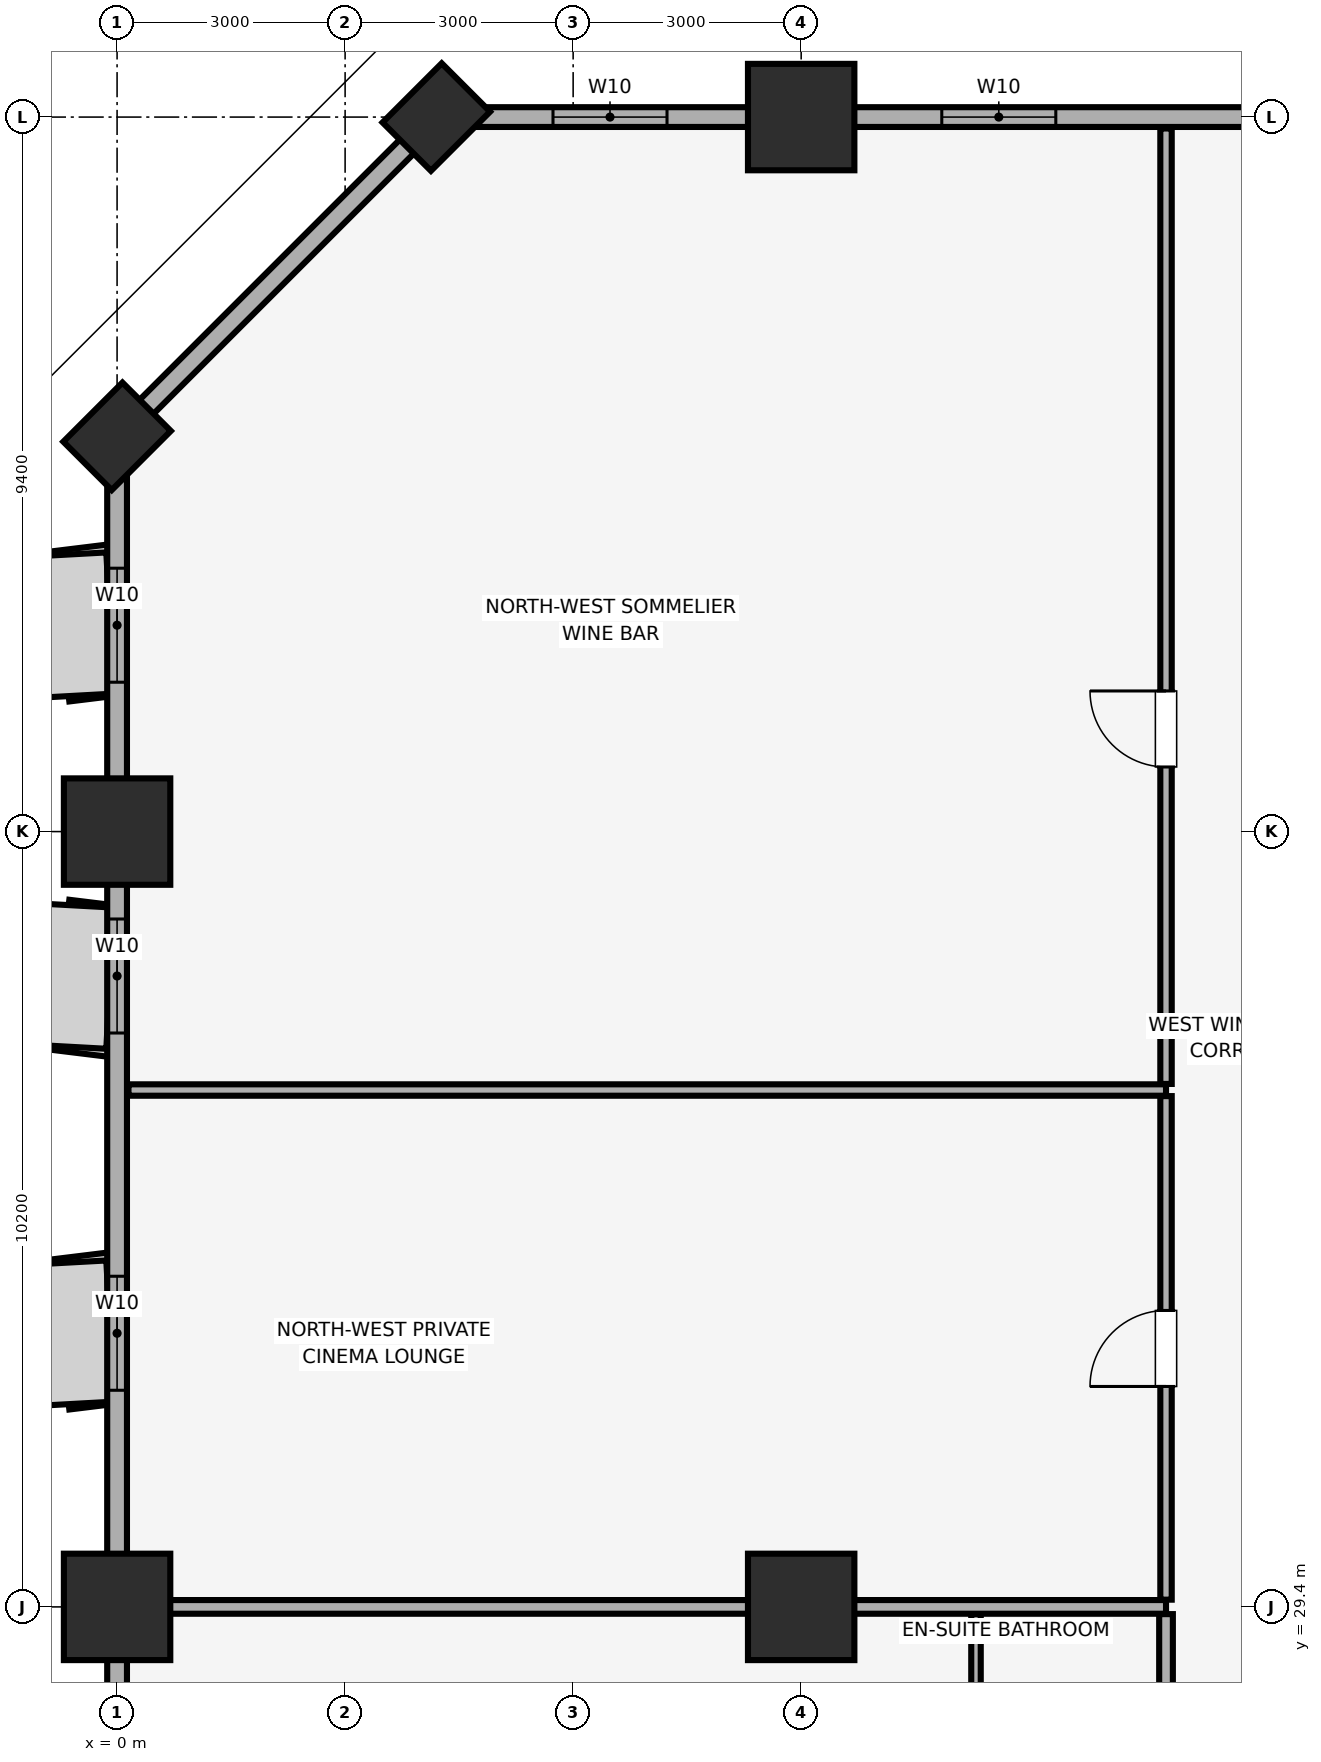
"""IFC4 building model, lengths in metres.
Left out: names, types, materials, properties, quantities, classifications, styles, units other than length and angle.
Written with IfcOpenShell. Run it as: python <this file> out.ifc"""

import sys

from ifc_helpers import new_model, si_unit, direction, frame, frame_2d, origin, origin_2d, place, context, subcontext, project, spatial, rectangle, extrude, element, fill, save


model = new_model("IFC4")
c1 = context("Model", 3, precision=1e-05, world=origin(), true_north=direction((0.0, 1.0)))
c2 = subcontext(c1, "Body", "Model", "MODEL_VIEW")
j1 = project(units=[si_unit("LENGTHUNIT", "METRE"), si_unit("PLANEANGLEUNIT", "RADIAN")], contexts=[c1])
p1 = place(None, origin())
s1 = spatial("IfcSite", under=j1, at=p1, CompositionType="ELEMENT")
p2 = place(p1, origin())
s2 = spatial("IfcBuilding", under=s1, at=p2, CompositionType="ELEMENT")
p3 = place(p2, frame((0.0, 0.0, 72.65)))
s3 = spatial("IfcBuildingStorey", under=s2, at=p3, CompositionType="ELEMENT", Elevation=72.65)
for number, where, z_axis, x_axis in (
    (1, (0.0, 29.4, 0.0), (0.0, 0.0, 1.0), (1.0, 0.0, 0.0)),
    (2, (0.0, 39.6, 0.0), (0.0, 0.0, 1.0), (1.0, 0.0, 0.0)),
):
    element("IfcColumn", number, at=place(p3, frame(where, z_axis=z_axis, x_axis=x_axis)), inside=s3, PredefinedType="COLUMN", context=c2, shape_type="SweptSolid", body=[
        extrude(rectangle(XDim=1.4, YDim=1.4, at=origin_2d()), origin(), (0.0, 0.0, 1.0), 3.51),
    ])
for number, where, z_axis, x_axis in (
    (3, (4.2, 49.0, 0.0), (0.0, 0.0, 1.0), (0.707, 0.707, 0.0)),
    (4, (0.0, 44.8, 0.0), (0.0, 0.0, 1.0), (0.707, 0.707, 0.0)),
):
    element("IfcColumn", number, at=place(p3, frame(where, z_axis=z_axis, x_axis=x_axis)), inside=s3, PredefinedType="PILASTER", context=c2, shape_type="SweptSolid", body=[
        extrude(rectangle(XDim=1.1, YDim=0.9, at=origin_2d()), origin(), (0.0, 0.0, 1.0), 3.51),
    ])
for number, where, z_axis, x_axis in (
    (5, (9.0, 29.4, 0.0), (0.0, 0.0, 1.0), (1.0, 0.0, 0.0)),
    (6, (9.0, 49.0, 0.0), (0.0, 0.0, 1.0), (1.0, 0.0, 0.0)),
):
    element("IfcColumn", number, at=place(p3, frame(where, z_axis=z_axis, x_axis=x_axis)), inside=s3, PredefinedType="COLUMN", context=c2, shape_type="SweptSolid", body=[
        extrude(rectangle(XDim=1.4, YDim=1.4, at=origin_2d()), origin(), (0.0, 0.0, 1.0), 3.51),
    ])
p4 = place(p3, frame((79.8, 49.0, 0.0), z_axis=(0.0, 0.0, 1.0), x_axis=(-1.0, 0.0, 0.0)))
e7 = element("IfcWall", 7, at=p4, inside=s3, PredefinedType="SOLIDWALL", context=c2, shape_type="SweptSolid", body=[
    extrude(rectangle(XDim=75.6, YDim=0.26, at=frame_2d((37.8, 0.0))), origin(), (0.0, 0.0, 1.0), 2.56),
])
p5 = place(p4, frame((72.565, 0.0, 0.85)))
e8 = element("IfcOpeningElement", 8, at=p5, cuts=e7, PredefinedType="OPENING", context=c2, shape_type="SweptSolid", body=[
    extrude(rectangle(XDim=1.5, YDim=1.4, at=frame_2d((0.75, 0.7))), frame((0.0, 0.14, 0.0), z_axis=(0.0, -1.0, 0.0), x_axis=(1.0, 0.0, 0.0)), (0.0, 0.0, 1.0), 0.28),
])
p6 = place(p4, frame((67.45, 0.0, 0.85)))
e9 = element("IfcOpeningElement", 9, at=p6, cuts=e7, PredefinedType="OPENING", context=c2, shape_type="SweptSolid", body=[
    extrude(rectangle(XDim=1.5, YDim=1.4, at=frame_2d((0.75, 0.7))), frame((0.0, 0.14, 0.0), z_axis=(0.0, -1.0, 0.0), x_axis=(1.0, 0.0, 0.0)), (0.0, 0.0, 1.0), 0.28),
])
p7 = place(p4, frame((6.65, 0.0, 0.85)))
e10 = element("IfcOpeningElement", 10, at=p7, cuts=e7, PredefinedType="OPENING", context=c2, shape_type="SweptSolid", body=[
    extrude(rectangle(XDim=1.5, YDim=1.4, at=frame_2d((0.75, 0.7))), frame((0.0, 0.14, 0.0), z_axis=(0.0, -1.0, 0.0), x_axis=(1.0, 0.0, 0.0)), (0.0, 0.0, 1.0), 0.28),
])
p8 = place(p4, frame((1.535, 0.0, 0.85)))
e11 = element("IfcOpeningElement", 11, at=p8, cuts=e7, PredefinedType="OPENING", context=c2, shape_type="SweptSolid", body=[
    extrude(rectangle(XDim=1.5, YDim=1.4, at=frame_2d((0.75, 0.7))), frame((0.0, 0.14, 0.0), z_axis=(0.0, -1.0, 0.0), x_axis=(1.0, 0.0, 0.0)), (0.0, 0.0, 1.0), 0.28),
])
p9 = place(p4, frame((51.365, 0.0, 0.9)))
e12 = element("IfcOpeningElement", 12, at=p9, cuts=e7, PredefinedType="OPENING", context=c2, shape_type="SweptSolid", body=[
    extrude(rectangle(XDim=1.5, YDim=1.4, at=frame_2d((0.75, 0.7))), frame((0.0, 0.14, 0.0), z_axis=(0.0, -1.0, 0.0), x_axis=(1.0, 0.0, 0.0)), (0.0, 0.0, 1.0), 0.28),
])
p10 = place(p4, frame((44.55, 0.0, 0.9)))
e13 = element("IfcOpeningElement", 13, at=p10, cuts=e7, PredefinedType="OPENING", context=c2, shape_type="SweptSolid", body=[
    extrude(rectangle(XDim=1.5, YDim=1.4, at=frame_2d((0.75, 0.7))), frame((0.0, 0.14, 0.0), z_axis=(0.0, -1.0, 0.0), x_axis=(1.0, 0.0, 0.0)), (0.0, 0.0, 1.0), 0.28),
])
p11 = place(p4, frame((28.1, 0.0, 0.9)))
e14 = element("IfcOpeningElement", 14, at=p11, cuts=e7, PredefinedType="OPENING", context=c2, shape_type="SweptSolid", body=[
    extrude(rectangle(XDim=1.5, YDim=1.4, at=frame_2d((0.75, 0.7))), frame((0.0, 0.14, 0.0), z_axis=(0.0, -1.0, 0.0), x_axis=(1.0, 0.0, 0.0)), (0.0, 0.0, 1.0), 0.28),
])
p12 = place(p4, frame((23.485, 0.0, 0.9)))
e15 = element("IfcOpeningElement", 15, at=p12, cuts=e7, PredefinedType="OPENING", context=c2, shape_type="SweptSolid", body=[
    extrude(rectangle(XDim=1.5, YDim=1.4, at=frame_2d((0.75, 0.7))), frame((0.0, 0.14, 0.0), z_axis=(0.0, -1.0, 0.0), x_axis=(1.0, 0.0, 0.0)), (0.0, 0.0, 1.0), 0.28),
])
p13 = place(p3, frame((4.2, 49.0, 0.0), z_axis=(0.0, 0.0, 1.0), x_axis=(-0.707106781187, -0.707106781187, 0.0)))
e16 = element("IfcWall", 16, at=p13, inside=s3, PredefinedType="SOLIDWALL", context=c2, shape_type="SweptSolid", body=[
    extrude(rectangle(XDim=5.94, YDim=0.26, at=frame_2d((2.97, 0.0))), origin(), (0.0, 0.0, 1.0), 2.56),
])
p14 = place(p3, frame((0.0, 44.8, 0.0), z_axis=(0.0, 0.0, 1.0), x_axis=(0.0, -1.0, 0.0)))
e17 = element("IfcWall", 17, at=p14, inside=s3, PredefinedType="SOLIDWALL", context=c2, shape_type="SweptSolid", body=[
    extrude(rectangle(XDim=40.6, YDim=0.26, at=frame_2d((20.3, 0.0))), origin(), (0.0, 0.0, 1.0), 2.56),
])
p15 = place(p14, frame((33.05, 0.0, 0.85)))
e18 = element("IfcOpeningElement", 18, at=p15, cuts=e17, PredefinedType="OPENING", context=c2, shape_type="SweptSolid", body=[
    extrude(rectangle(XDim=1.5, YDim=1.4, at=frame_2d((0.75, 0.7))), frame((0.0, 0.14, 0.0), z_axis=(0.0, -1.0, 0.0), x_axis=(1.0, 0.0, 0.0)), (0.0, 0.0, 1.0), 0.28),
])
p16 = place(p14, frame((26.75, 0.0, 0.85)))
e19 = element("IfcOpeningElement", 19, at=p16, cuts=e17, PredefinedType="OPENING", context=c2, shape_type="SweptSolid", body=[
    extrude(rectangle(XDim=1.5, YDim=1.4, at=frame_2d((0.75, 0.7))), frame((0.0, 0.14, 0.0), z_axis=(0.0, -1.0, 0.0), x_axis=(1.0, 0.0, 0.0)), (0.0, 0.0, 1.0), 0.28),
])
p17 = place(p14, frame((16.935, 0.0, 0.85)))
e20 = element("IfcOpeningElement", 20, at=p17, cuts=e17, PredefinedType="OPENING", context=c2, shape_type="SweptSolid", body=[
    extrude(rectangle(XDim=1.5, YDim=1.4, at=frame_2d((0.75, 0.7))), frame((0.0, 0.14, 0.0), z_axis=(0.0, -1.0, 0.0), x_axis=(1.0, 0.0, 0.0)), (0.0, 0.0, 1.0), 0.28),
])
p18 = place(p14, frame((11.05, 0.0, 0.85)))
e21 = element("IfcOpeningElement", 21, at=p18, cuts=e17, PredefinedType="OPENING", context=c2, shape_type="SweptSolid", body=[
    extrude(rectangle(XDim=1.5, YDim=1.4, at=frame_2d((0.75, 0.7))), frame((0.0, 0.14, 0.0), z_axis=(0.0, -1.0, 0.0), x_axis=(1.0, 0.0, 0.0)), (0.0, 0.0, 1.0), 0.28),
])
p19 = place(p14, frame((6.35, 0.0, 0.85)))
e22 = element("IfcOpeningElement", 22, at=p19, cuts=e17, PredefinedType="OPENING", context=c2, shape_type="SweptSolid", body=[
    extrude(rectangle(XDim=1.5, YDim=1.4, at=frame_2d((0.75, 0.7))), frame((0.0, 0.14, 0.0), z_axis=(0.0, -1.0, 0.0), x_axis=(1.0, 0.0, 0.0)), (0.0, 0.0, 1.0), 0.28),
])
p20 = place(p14, frame((1.735, 0.0, 0.85)))
e23 = element("IfcOpeningElement", 23, at=p20, cuts=e17, PredefinedType="OPENING", context=c2, shape_type="SweptSolid", body=[
    extrude(rectangle(XDim=1.5, YDim=1.4, at=frame_2d((0.75, 0.7))), frame((0.0, 0.14, 0.0), z_axis=(0.0, -1.0, 0.0), x_axis=(1.0, 0.0, 0.0)), (0.0, 0.0, 1.0), 0.28),
])
p21 = place(p3, frame((0.15, 29.4, 0.0), z_axis=(0.0, 0.0, 1.0), x_axis=(1.0, 0.0, 0.0)))
e24 = element("IfcWall", 24, at=p21, inside=s3, PredefinedType="PARTITIONING", context=c2, shape_type="SweptSolid", body=[
    extrude(rectangle(XDim=13.65, YDim=0.18, at=frame_2d((6.825, 0.0))), origin(), (0.0, 0.0, 1.0), 2.86),
])
p22 = place(p3, frame((13.8, 25.325, 0.0), z_axis=(0.0, 0.0, 1.0), x_axis=(0.0, 1.0, 0.0)))
e25 = element("IfcWall", 25, at=p22, inside=s3, PredefinedType="PARTITIONING", context=c2, shape_type="SweptSolid", body=[
    extrude(rectangle(XDim=3.98, YDim=0.18, at=frame_2d((1.99, 0.0))), origin(), (0.0, 0.0, 1.0), 3.51),
])
p23 = place(p22, frame((0.465, 0.0, 0.0)))
e26 = element("IfcOpeningElement", 26, at=p23, cuts=e25, PredefinedType="OPENING", context=c2, shape_type="SweptSolid", body=[
    extrude(rectangle(XDim=1.0, YDim=2.15, at=frame_2d((0.5, 1.075))), frame((0.0, 0.1, 0.0), z_axis=(0.0, -1.0, 0.0), x_axis=(1.0, 0.0, 0.0)), (0.0, 0.0, 1.0), 0.2),
])
p24 = place(p3, frame((11.3, 27.417, 0.0), z_axis=(0.0, 0.0, 1.0), x_axis=(0.0, 1.0, 0.0)))
e27 = element("IfcWall", 27, at=p24, inside=s3, PredefinedType="PARTITIONING", context=c2, shape_type="SweptSolid", body=[
    extrude(rectangle(XDim=1.887, YDim=0.125, at=frame_2d((0.944, 0.0))), origin(), (0.0, 0.0, 1.0), 3.51),
])
p25 = place(p3, frame((0.15, 36.2, 0.0), z_axis=(0.0, 0.0, 1.0), x_axis=(1.0, 0.0, 0.0)))
e28 = element("IfcWall", 28, at=p25, inside=s3, PredefinedType="PARTITIONING", context=c2, shape_type="SweptSolid", body=[
    extrude(rectangle(XDim=13.65, YDim=0.15, at=frame_2d((6.825, 0.0))), origin(), (0.0, 0.0, 1.0), 3.51),
])
p26 = place(p3, frame((13.8, 29.495, 0.0), z_axis=(0.0, 0.0, 1.0), x_axis=(0.0, 1.0, 0.0)))
e29 = element("IfcWall", 29, at=p26, inside=s3, PredefinedType="PARTITIONING", context=c2, shape_type="SweptSolid", body=[
    extrude(rectangle(XDim=6.625, YDim=0.15, at=frame_2d((3.312, 0.0))), origin(), (0.0, 0.0, 1.0), 3.51),
])
p27 = place(p26, frame((2.805, 0.0, 0.0)))
e30 = element("IfcOpeningElement", 30, at=p27, cuts=e29, PredefinedType="OPENING", context=c2, shape_type="SweptSolid", body=[
    extrude(rectangle(XDim=1.0, YDim=2.15, at=frame_2d((0.5, 1.075))), frame((0.0, 0.085, 0.0), z_axis=(0.0, -1.0, 0.0), x_axis=(1.0, 0.0, 0.0)), (0.0, 0.0, 1.0), 0.17),
])
p28 = place(p3, frame((13.8, 36.28, 0.0), z_axis=(0.0, 0.0, 1.0), x_axis=(0.0, 1.0, 0.0)))
e31 = element("IfcWall", 31, at=p28, inside=s3, PredefinedType="PARTITIONING", context=c2, shape_type="SweptSolid", body=[
    extrude(rectangle(XDim=12.57, YDim=0.15, at=frame_2d((6.285, 0.0))), origin(), (0.0, 0.0, 1.0), 3.51),
])
p29 = place(p28, frame((4.17, 0.0, 0.0)))
e32 = element("IfcOpeningElement", 32, at=p29, cuts=e31, PredefinedType="OPENING", context=c2, shape_type="SweptSolid", body=[
    extrude(rectangle(XDim=1.0, YDim=2.15, at=frame_2d((0.5, 1.075))), frame((0.0, 0.085, 0.0), z_axis=(0.0, -1.0, 0.0), x_axis=(1.0, 0.0, 0.0)), (0.0, 0.0, 1.0), 0.17),
])
p30 = place(p18, origin())
e33 = element("IfcWindow", 33, at=p30, inside=s3, PartitioningType="SINGLE_PANEL", PredefinedType="WINDOW", context=c2, shape_type="SweptSolid", body=[
    extrude(rectangle(XDim=1.5, YDim=1.4, at=frame_2d((0.75, 0.7))), frame((0.0, 0.03, 0.0), z_axis=(0.0, -1.0, 0.0), x_axis=(1.0, 0.0, 0.0)), (0.0, 0.0, 1.0), 0.06),
])
fill(e21, e33)
p31 = place(p19, origin())
e34 = element("IfcWindow", 34, at=p31, inside=s3, PartitioningType="SINGLE_PANEL", PredefinedType="WINDOW", context=c2, shape_type="SweptSolid", body=[
    extrude(rectangle(XDim=1.5, YDim=1.4, at=frame_2d((0.75, 0.7))), frame((0.0, 0.03, 0.0), z_axis=(0.0, -1.0, 0.0), x_axis=(1.0, 0.0, 0.0)), (0.0, 0.0, 1.0), 0.06),
])
fill(e22, e34)
p32 = place(p20, origin())
e35 = element("IfcWindow", 35, at=p32, inside=s3, PartitioningType="SINGLE_PANEL", PredefinedType="WINDOW", context=c2, shape_type="SweptSolid", body=[
    extrude(rectangle(XDim=1.5, YDim=1.4, at=frame_2d((0.75, 0.7))), frame((0.0, 0.03, 0.0), z_axis=(0.0, -1.0, 0.0), x_axis=(1.0, 0.0, 0.0)), (0.0, 0.0, 1.0), 0.06),
])
fill(e23, e35)
p33 = place(p5, origin())
e36 = element("IfcWindow", 36, at=p33, inside=s3, PartitioningType="SINGLE_PANEL", PredefinedType="WINDOW", context=c2, shape_type="SweptSolid", body=[
    extrude(rectangle(XDim=1.5, YDim=1.4, at=frame_2d((0.75, 0.7))), frame((0.0, 0.03, 0.0), z_axis=(0.0, -1.0, 0.0), x_axis=(1.0, 0.0, 0.0)), (0.0, 0.0, 1.0), 0.06),
])
fill(e8, e36)
p34 = place(p6, origin())
e37 = element("IfcWindow", 37, at=p34, inside=s3, PartitioningType="SINGLE_PANEL", PredefinedType="WINDOW", context=c2, shape_type="SweptSolid", body=[
    extrude(rectangle(XDim=1.5, YDim=1.4, at=frame_2d((0.75, 0.7))), frame((0.0, 0.03, 0.0), z_axis=(0.0, -1.0, 0.0), x_axis=(1.0, 0.0, 0.0)), (0.0, 0.0, 1.0), 0.06),
])
fill(e9, e37)
p35 = place(p27, origin())
e38 = element("IfcDoor", 38, at=p35, inside=s3, OperationType="SINGLE_SWING_LEFT", PredefinedType="DOOR", context=c2, shape_type="SweptSolid", body=[
    extrude(rectangle(XDim=1.0, YDim=2.15, at=frame_2d((0.5, 1.075))), frame((0.0, 0.025, 0.0), z_axis=(0.0, -1.0, 0.0), x_axis=(1.0, 0.0, 0.0)), (0.0, 0.0, 1.0), 0.05),
])
fill(e30, e38)
p36 = place(p29, origin())
e39 = element("IfcDoor", 39, at=p36, inside=s3, OperationType="SINGLE_SWING_RIGHT", PredefinedType="DOOR", context=c2, shape_type="SweptSolid", body=[
    extrude(rectangle(XDim=1.0, YDim=2.15, at=frame_2d((0.5, 1.075))), frame((0.0, 0.025, 0.0), z_axis=(0.0, -1.0, 0.0), x_axis=(1.0, 0.0, 0.0)), (0.0, 0.0, 1.0), 0.05),
])
fill(e32, e39)
save(model, sys.argv[1])
